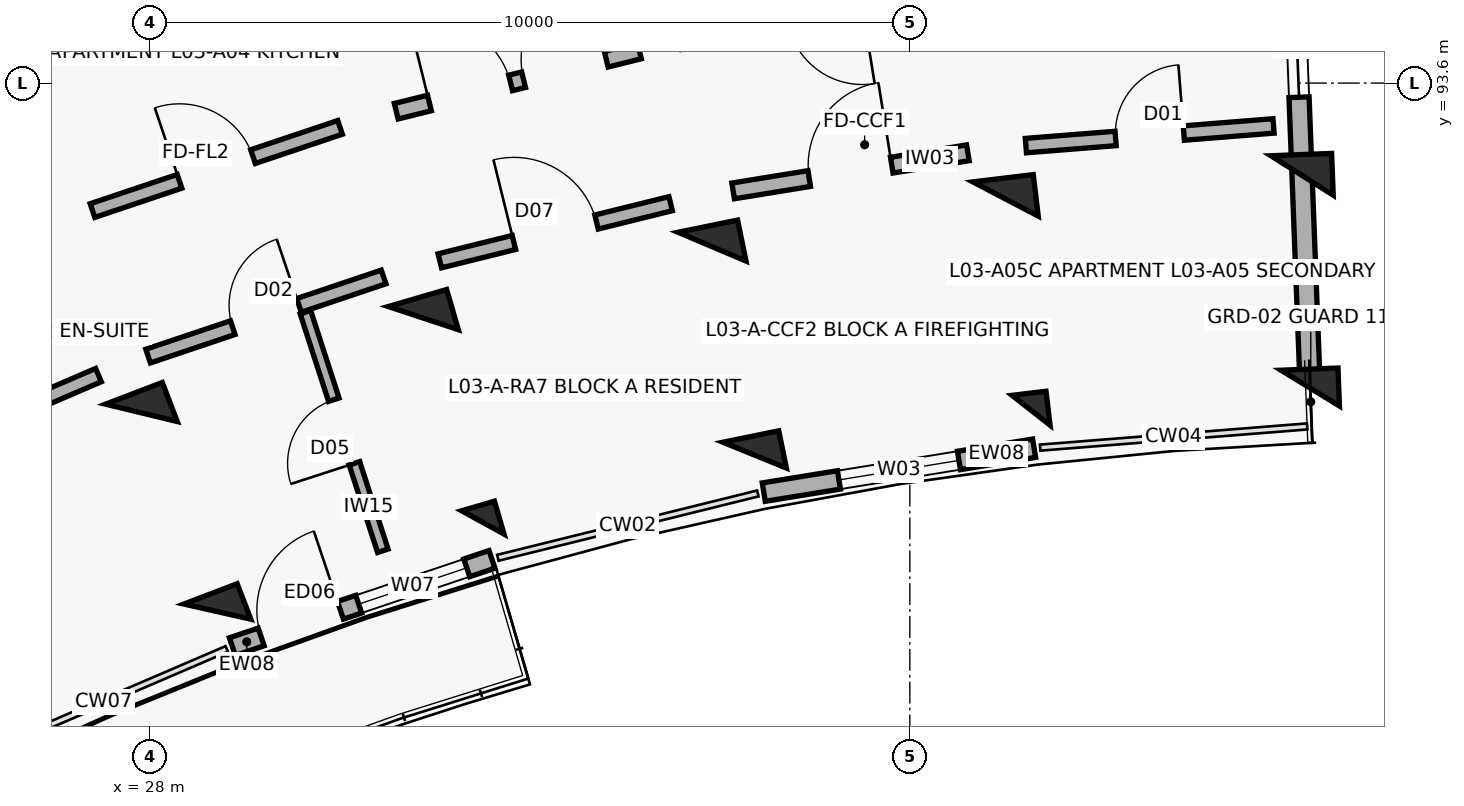
"""IFC4 building model, lengths in metres.
Left out: names, types, materials, properties, quantities, classifications, styles, units other than length and angle.
Written with IfcOpenShell. Run it as: python <this file> out.ifc"""

import sys

from ifc_helpers import new_model, si_unit, direction, frame, frame_2d, origin, origin_2d, place, context, subcontext, project, spatial, rectangle, extrude, element, fill, save


model = new_model("IFC4")
c1 = context("Model", 3, precision=1e-05, world=origin(), true_north=direction((0.0, 1.0)))
c2 = subcontext(c1, "Body", "Model", "MODEL_VIEW")
j1 = project(units=[si_unit("LENGTHUNIT", "METRE"), si_unit("PLANEANGLEUNIT", "RADIAN")], contexts=[c1])
p1 = place(None, origin())
s1 = spatial("IfcSite", under=j1, at=p1, CompositionType="ELEMENT")
p2 = place(p1, origin())
s2 = spatial("IfcBuilding", under=s1, at=p2, CompositionType="ELEMENT")
p3 = place(p2, frame((0.0, 0.0, 11.2)))
s3 = spatial("IfcBuildingStorey", under=s2, at=p3, CompositionType="ELEMENT", Elevation=11.2)
p4 = place(p3, frame((28.889, 86.646, 0.0), z_axis=(0.0, 0.0, 1.0), x_axis=(-0.357064076459, 0.934079892355, 0.0)))
e1 = element("IfcColumn", 1, at=p4, inside=s3, PredefinedType="COLUMN", context=c2, shape_type="SweptSolid", body=[
    extrude(rectangle(XDim=0.5, YDim=0.75, at=origin_2d()), origin(), (0.0, 0.0, 1.0), 3.1),
])
p5 = place(p3, frame((27.889, 89.261, 0.0), z_axis=(0.0, 0.0, 1.0), x_axis=(-0.357064076459, 0.934079892355, 0.0)))
e2 = element("IfcColumn", 2, at=p5, inside=s3, PredefinedType="COLUMN", context=c2, shape_type="SweptSolid", body=[
    extrude(rectangle(XDim=0.55, YDim=0.8, at=origin_2d()), origin(), (0.0, 0.0, 1.0), 3.1),
])
p6 = place(p3, frame((32.382, 87.82, 0.0), z_axis=(0.0, 0.0, 1.0), x_axis=(-0.27966144946, 0.96009867914, 0.0)))
e3 = element("IfcColumn", 3, at=p6, inside=s3, PredefinedType="COLUMN", context=c2, shape_type="SweptSolid", body=[
    extrude(rectangle(XDim=0.45, YDim=0.45, at=origin_2d()), origin(), (0.0, 0.0, 1.0), 3.1),
])
p7 = place(p3, frame((31.599, 90.508, 0.0), z_axis=(0.0, 0.0, 1.0), x_axis=(-0.27966144946, 0.96009867914, 0.0)))
e4 = element("IfcColumn", 4, at=p7, inside=s3, PredefinedType="COLUMN", context=c2, shape_type="SweptSolid", body=[
    extrude(rectangle(XDim=0.55, YDim=0.8, at=origin_2d()), origin(), (0.0, 0.0, 1.0), 3.1),
])
p8 = place(p3, frame((35.958, 88.705, 0.0), z_axis=(0.0, 0.0, 1.0), x_axis=(-0.200393999665, 0.979715389742, 0.0)))
e5 = element("IfcColumn", 5, at=p8, inside=s3, PredefinedType="COLUMN", context=c2, shape_type="SweptSolid", body=[
    extrude(rectangle(XDim=0.5, YDim=0.75, at=origin_2d()), origin(), (0.0, 0.0, 1.0), 3.1),
])
p9 = place(p3, frame((35.397, 91.448, 0.0), z_axis=(0.0, 0.0, 1.0), x_axis=(-0.200393999665, 0.979715389742, 0.0)))
e6 = element("IfcColumn", 6, at=p9, inside=s3, PredefinedType="COLUMN", context=c2, shape_type="SweptSolid", body=[
    extrude(rectangle(XDim=0.55, YDim=0.8, at=origin_2d()), origin(), (0.0, 0.0, 1.0), 3.1),
])
p10 = place(p3, frame((39.595, 89.295, 0.0), z_axis=(0.0, 0.0, 1.0), x_axis=(-0.119790293837, 0.992799217114, 0.0)))
e7 = element("IfcColumn", 7, at=p10, inside=s3, PredefinedType="COLUMN", context=c2, shape_type="SweptSolid", body=[
    extrude(rectangle(XDim=0.45, YDim=0.45, at=origin_2d()), origin(), (0.0, 0.0, 1.0), 3.1),
])
p11 = place(p3, frame((39.26, 92.075, 0.0), z_axis=(0.0, 0.0, 1.0), x_axis=(-0.119790293837, 0.992799217114, 0.0)))
e8 = element("IfcColumn", 8, at=p11, inside=s3, PredefinedType="COLUMN", context=c2, shape_type="SweptSolid", body=[
    extrude(rectangle(XDim=0.55, YDim=0.8, at=origin_2d()), origin(), (0.0, 0.0, 1.0), 3.1),
])
p12 = place(p3, frame((43.268, 89.587, 0.0), z_axis=(0.0, 0.0, 1.0), x_axis=(-0.038387809088, 0.999262916411, 0.0)))
e9 = element("IfcColumn", 9, at=p12, inside=s3, PredefinedType="COLUMN", context=c2, shape_type="SweptSolid", body=[
    extrude(rectangle(XDim=0.5, YDim=0.75, at=origin_2d()), origin(), (0.0, 0.0, 1.0), 3.1),
])
p13 = place(p3, frame((43.16, 92.385, 0.0), z_axis=(0.0, 0.0, 1.0), x_axis=(-0.038387809088, 0.999262916411, 0.0)))
e10 = element("IfcColumn", 10, at=p13, inside=s3, PredefinedType="COLUMN", context=c2, shape_type="SweptSolid", body=[
    extrude(rectangle(XDim=0.55, YDim=0.8, at=origin_2d()), origin(), (0.0, 0.0, 1.0), 3.1),
])
p14 = place(p3, frame((29.087, 86.185, 0.0), z_axis=(0.0, 0.0, 1.0), x_axis=(0.947880824442, 0.318625081649, 0.0)))
e11 = element("IfcWall", 11, at=p14, inside=s3, PredefinedType="SOLIDWALL", context=c2, shape_type="SweptSolid", body=[
    extrude(rectangle(XDim=3.604, YDim=0.245, at=frame_2d((1.802, 0.0))), origin(), (0.0, 0.0, 1.0), 2.25),
])
p15 = place(p14, frame((0.4, 0.0, 0.0)))
e12 = element("IfcOpeningElement", 12, at=p15, cuts=e11, PredefinedType="OPENING", context=c2, shape_type="SweptSolid", body=[
    extrude(rectangle(XDim=1.1, YDim=2.15, at=frame_2d((0.55, 1.075))), frame((0.0, 0.133, 0.0), z_axis=(0.0, -1.0, 0.0), x_axis=(1.0, 0.0, 0.0)), (0.0, 0.0, 1.0), 0.265),
])
p16 = place(p14, frame((1.754, 0.0, 0.35)))
e13 = element("IfcOpeningElement", 13, at=p16, cuts=e11, PredefinedType="OPENING", context=c2, shape_type="SweptSolid", body=[
    extrude(rectangle(XDim=1.5, YDim=1.65, at=frame_2d((0.75, 0.825))), frame((0.0, 0.133, 0.0), z_axis=(0.0, -1.0, 0.0), x_axis=(1.0, 0.0, 0.0)), (0.0, 0.0, 1.0), 0.265),
])
p17 = place(p3, frame((36.078, 88.218, 0.0), z_axis=(0.0, 0.0, 1.0), x_axis=(0.987080874485, 0.160222804952, 0.0)))
e14 = element("IfcWall", 14, at=p17, inside=s3, PredefinedType="SOLIDWALL", context=c2, shape_type="SweptSolid", body=[
    extrude(rectangle(XDim=3.604, YDim=0.245, at=frame_2d((1.802, 0.0))), origin(), (0.0, 0.0, 1.0), 2.25),
])
p18 = place(p17, frame((1.002, 0.0, 0.32)))
e15 = element("IfcOpeningElement", 15, at=p18, cuts=e14, PredefinedType="OPENING", context=c2, shape_type="SweptSolid", body=[
    extrude(rectangle(XDim=1.6, YDim=1.5, at=frame_2d((0.8, 0.75))), frame((0.0, 0.133, 0.0), z_axis=(0.0, -1.0, 0.0), x_axis=(1.0, 0.0, 0.0)), (0.0, 0.0, 1.0), 0.265),
])
p19 = place(p3, frame((43.259, 89.827, 0.0), z_axis=(0.0, 0.0, 1.0), x_axis=(-0.038407966241, 0.999262141847, 0.0)))
e16 = element("IfcWall", 16, at=p19, inside=s3, PredefinedType="SOLIDWALL", context=c2, shape_type="SweptSolid", body=[
    extrude(rectangle(XDim=8.2, YDim=0.265, at=frame_2d((4.1, 0.0))), origin(), (0.0, 0.0, 1.0), 2.08),
])
p20 = place(p19, frame((3.59, 0.0, 0.75)))
e17 = element("IfcOpeningElement", 17, at=p20, cuts=e16, PredefinedType="OPENING", context=c2, shape_type="SweptSolid", body=[
    extrude(rectangle(XDim=1.35, YDim=1.35, at=frame_2d((0.675, 0.675))), frame((0.0, 0.142, 0.0), z_axis=(0.0, -1.0, 0.0), x_axis=(1.0, 0.0, 0.0)), (0.0, 0.0, 1.0), 0.285),
])
p21 = place(p3, frame((24.322, 88.467, 0.0), z_axis=(0.0, 0.0, 1.0), x_axis=(0.918723391052, 0.394901672235, 0.0)))
e18 = element("IfcWall", 18, at=p21, inside=s3, PredefinedType="SOLIDWALL", context=c2, shape_type="SweptSolid", body=[
    extrude(rectangle(XDim=3.269, YDim=0.19, at=frame_2d((1.634, 0.0))), origin(), (0.0, 0.0, 1.0), 2.08),
])
p22 = place(p21, frame((1.184, 0.0, 0.0)))
e19 = element("IfcOpeningElement", 19, at=p22, cuts=e18, PredefinedType="OPENING", context=c2, shape_type="SweptSolid", body=[
    extrude(rectangle(XDim=0.9, YDim=2.1, at=frame_2d((0.45, 1.05))), frame((0.0, 0.105, 0.0), z_axis=(0.0, -1.0, 0.0), x_axis=(1.0, 0.0, 0.0)), (0.0, 0.0, 1.0), 0.21),
])
p23 = place(p3, frame((27.247, 91.923, 0.0), z_axis=(0.0, 0.0, 1.0), x_axis=(0.947863007629, 0.318678080151, 0.0)))
e20 = element("IfcWall", 20, at=p23, inside=s3, PredefinedType="SOLIDWALL", context=c2, shape_type="SweptSolid", body=[
    extrude(rectangle(XDim=3.436, YDim=0.19, at=frame_2d((1.718, 0.0))), origin(), (0.0, 0.0, 1.0), 2.08),
])
p24 = place(p23, frame((1.208, 0.0, 0.0)))
e21 = element("IfcOpeningElement", 21, at=p24, cuts=e20, PredefinedType="OPENING", context=c2, shape_type="SweptSolid", body=[
    extrude(rectangle(XDim=1.02, YDim=2.15, at=frame_2d((0.51, 1.075))), frame((0.0, 0.105, 0.0), z_axis=(0.0, -1.0, 0.0), x_axis=(1.0, 0.0, 0.0)), (0.0, 0.0, 1.0), 0.21),
])
p25 = place(p3, frame((27.979, 90.008, 0.0), z_axis=(0.0, 0.0, 1.0), x_axis=(0.94787351033, 0.318646839643, 0.0)))
e22 = element("IfcWall", 22, at=p25, inside=s3, PredefinedType="SOLIDWALL", context=c2, shape_type="SweptSolid", body=[
    extrude(rectangle(XDim=3.269, YDim=0.19, at=frame_2d((1.634, 0.0))), origin(), (0.0, 0.0, 1.0), 2.08),
])
p26 = place(p25, frame((1.174, 0.0, 0.0)))
e23 = element("IfcOpeningElement", 23, at=p26, cuts=e22, PredefinedType="OPENING", context=c2, shape_type="SweptSolid", body=[
    extrude(rectangle(XDim=0.92, YDim=2.1, at=frame_2d((0.46, 1.05))), frame((0.0, 0.105, 0.0), z_axis=(0.0, -1.0, 0.0), x_axis=(1.0, 0.0, 0.0)), (0.0, 0.0, 1.0), 0.21),
])
p27 = place(p3, frame((31.066, 87.446, 0.0), z_axis=(0.0, 0.0, 1.0), x_axis=(-0.308582493915, 0.951197584337, 0.0)))
e24 = element("IfcWall", 24, at=p27, inside=s3, PredefinedType="PARTITIONING", context=c2, shape_type="SweptSolid", body=[
    extrude(rectangle(XDim=3.3, YDim=0.145, at=frame_2d((1.65, 0.0))), origin(), (0.0, 0.0, 1.0), 2.08),
])
p28 = place(p27, frame((1.21, 0.0, 0.0)))
e25 = element("IfcOpeningElement", 25, at=p28, cuts=e24, PredefinedType="OPENING", context=c2, shape_type="SweptSolid", body=[
    extrude(rectangle(XDim=0.88, YDim=2.1, at=frame_2d((0.44, 1.05))), frame((0.0, 0.083, 0.0), z_axis=(0.0, -1.0, 0.0), x_axis=(1.0, 0.0, 0.0)), (0.0, 0.0, 1.0), 0.165),
])
p29 = place(p3, frame((31.243, 93.23, 0.0), z_axis=(0.0, 0.0, 1.0), x_axis=(0.970719238682, 0.240216901263, 0.0)))
e26 = element("IfcWall", 26, at=p29, inside=s3, PredefinedType="SOLIDWALL", context=c2, shape_type="SweptSolid", body=[
    extrude(rectangle(XDim=3.296, YDim=0.21, at=frame_2d((1.648, 0.0))), origin(), (0.0, 0.0, 1.0), 2.08),
])
p30 = place(p29, frame((0.45, 0.0, 0.0)))
e27 = element("IfcOpeningElement", 27, at=p30, cuts=e26, PredefinedType="OPENING", context=c2, shape_type="SweptSolid", body=[
    extrude(rectangle(XDim=1.1, YDim=2.15, at=frame_2d((0.55, 1.075))), frame((0.0, 0.115, 0.0), z_axis=(0.0, -1.0, 0.0), x_axis=(1.0, 0.0, 0.0)), (0.0, 0.0, 1.0), 0.23),
])
p31 = place(p29, frame((1.726, 0.0, 0.0)))
e28 = element("IfcOpeningElement", 28, at=p31, cuts=e26, PredefinedType="OPENING", context=c2, shape_type="SweptSolid", body=[
    extrude(rectangle(XDim=1.12, YDim=2.15, at=frame_2d((0.56, 1.075))), frame((0.0, 0.115, 0.0), z_axis=(0.0, -1.0, 0.0), x_axis=(1.0, 0.0, 0.0)), (0.0, 0.0, 1.0), 0.23),
])
p32 = place(p3, frame((31.816, 91.262, 0.0), z_axis=(0.0, 0.0, 1.0), x_axis=(0.970727194092, 0.240184751078, 0.0)))
e29 = element("IfcWall", 29, at=p32, inside=s3, PredefinedType="SOLIDWALL", context=c2, shape_type="SweptSolid", body=[
    extrude(rectangle(XDim=3.129, YDim=0.19, at=frame_2d((1.564, 0.0))), origin(), (0.0, 0.0, 1.0), 2.08),
])
p33 = place(p32, frame((1.004, 0.0, 0.0)))
e30 = element("IfcOpeningElement", 30, at=p33, cuts=e29, PredefinedType="OPENING", context=c2, shape_type="SweptSolid", body=[
    extrude(rectangle(XDim=1.12, YDim=2.15, at=frame_2d((0.56, 1.075))), frame((0.0, 0.105, 0.0), z_axis=(0.0, -1.0, 0.0), x_axis=(1.0, 0.0, 0.0)), (0.0, 0.0, 1.0), 0.21),
])
p34 = place(p3, frame((35.676, 92.181, 0.0), z_axis=(0.0, 0.0, 1.0), x_axis=(0.98707079686, 0.160284877599, 0.0)))
e31 = element("IfcWall", 31, at=p34, inside=s3, PredefinedType="SOLIDWALL", context=c2, shape_type="SweptSolid", body=[
    extrude(rectangle(XDim=3.129, YDim=0.21, at=frame_2d((1.564, 0.0))), origin(), (0.0, 0.0, 1.0), 2.08),
])
p35 = place(p34, frame((1.014, 0.0, 0.0)))
e32 = element("IfcOpeningElement", 32, at=p35, cuts=e31, PredefinedType="OPENING", context=c2, shape_type="SweptSolid", body=[
    extrude(rectangle(XDim=1.1, YDim=2.15, at=frame_2d((0.55, 1.075))), frame((0.0, 0.115, 0.0), z_axis=(0.0, -1.0, 0.0), x_axis=(1.0, 0.0, 0.0)), (0.0, 0.0, 1.0), 0.23),
])
p36 = place(p3, frame((39.527, 92.778, 0.0), z_axis=(0.0, 0.0, 1.0), x_axis=(0.99686660806, 0.07910098441, 0.0)))
e33 = element("IfcWall", 33, at=p36, inside=s3, PredefinedType="SOLIDWALL", context=c2, shape_type="SweptSolid", body=[
    extrude(rectangle(XDim=3.269, YDim=0.19, at=frame_2d((1.634, 0.0))), origin(), (0.0, 0.0, 1.0), 2.08),
])
p37 = place(p36, frame((1.184, 0.0, 0.0)))
e34 = element("IfcOpeningElement", 34, at=p37, cuts=e33, PredefinedType="OPENING", context=c2, shape_type="SweptSolid", body=[
    extrude(rectangle(XDim=0.9, YDim=2.1, at=frame_2d((0.45, 1.05))), frame((0.0, 0.105, 0.0), z_axis=(0.0, -1.0, 0.0), x_axis=(1.0, 0.0, 0.0)), (0.0, 0.0, 1.0), 0.21),
])
p38 = place(p15, origin())
e35 = element("IfcDoor", 35, at=p38, inside=s3, OperationType="SINGLE_SWING_RIGHT", PredefinedType="DOOR", context=c2, shape_type="SweptSolid", body=[
    extrude(rectangle(XDim=1.1, YDim=2.15, at=frame_2d((0.55, 1.075))), frame((0.0, 0.025, 0.0), z_axis=(0.0, -1.0, 0.0), x_axis=(1.0, 0.0, 0.0)), (0.0, 0.0, 1.0), 0.05),
])
fill(e12, e35)
p39 = place(p16, origin())
e36 = element("IfcWindow", 36, at=p39, inside=s3, PartitioningType="DOUBLE_PANEL_VERTICAL", PredefinedType="WINDOW", context=c2, shape_type="SweptSolid", body=[
    extrude(rectangle(XDim=1.5, YDim=1.65, at=frame_2d((0.75, 0.825))), frame((0.0, 0.03, 0.0), z_axis=(0.0, -1.0, 0.0), x_axis=(1.0, 0.0, 0.0)), (0.0, 0.0, 1.0), 0.06),
])
fill(e13, e36)
p40 = place(p18, origin())
e37 = element("IfcWindow", 37, at=p40, inside=s3, PartitioningType="DOUBLE_PANEL_VERTICAL", PredefinedType="WINDOW", context=c2, shape_type="SweptSolid", body=[
    extrude(rectangle(XDim=1.6, YDim=1.5, at=frame_2d((0.8, 0.75))), frame((0.0, 0.03, 0.0), z_axis=(0.0, -1.0, 0.0), x_axis=(1.0, 0.0, 0.0)), (0.0, 0.0, 1.0), 0.06),
])
fill(e15, e37)
p41 = place(p20, origin())
e38 = element("IfcWindow", 38, at=p41, inside=s3, PartitioningType="DOUBLE_PANEL_VERTICAL", PredefinedType="WINDOW", context=c2, shape_type="SweptSolid", body=[
    extrude(rectangle(XDim=1.35, YDim=1.35, at=frame_2d((0.675, 0.675))), frame((0.0, 0.03, 0.0), z_axis=(0.0, -1.0, 0.0), x_axis=(1.0, 0.0, 0.0)), (0.0, 0.0, 1.0), 0.06),
])
fill(e17, e38)
p42 = place(p24, origin())
e39 = element("IfcDoor", 39, at=p42, inside=s3, OperationType="SINGLE_SWING_LEFT", PredefinedType="DOOR", context=c2, shape_type="SweptSolid", body=[
    extrude(rectangle(XDim=1.02, YDim=2.15, at=frame_2d((0.51, 1.075))), frame((0.0, 0.025, 0.0), z_axis=(0.0, -1.0, 0.0), x_axis=(1.0, 0.0, 0.0)), (0.0, 0.0, 1.0), 0.05),
])
fill(e21, e39)
p43 = place(p26, origin())
e40 = element("IfcDoor", 40, at=p43, inside=s3, OperationType="SINGLE_SWING_RIGHT", PredefinedType="DOOR", context=c2, shape_type="SweptSolid", body=[
    extrude(rectangle(XDim=0.92, YDim=2.1, at=frame_2d((0.46, 1.05))), frame((0.0, 0.025, 0.0), z_axis=(0.0, -1.0, 0.0), x_axis=(1.0, 0.0, 0.0)), (0.0, 0.0, 1.0), 0.05),
])
fill(e23, e40)
p44 = place(p28, origin())
e41 = element("IfcDoor", 41, at=p44, inside=s3, OperationType="SINGLE_SWING_LEFT", PredefinedType="DOOR", context=c2, shape_type="SweptSolid", body=[
    extrude(rectangle(XDim=0.88, YDim=2.1, at=frame_2d((0.44, 1.05))), frame((0.0, 0.025, 0.0), z_axis=(0.0, -1.0, 0.0), x_axis=(1.0, 0.0, 0.0)), (0.0, 0.0, 1.0), 0.05),
])
fill(e25, e41)
p45 = place(p30, origin())
e42 = element("IfcDoor", 42, at=p45, inside=s3, OperationType="SINGLE_SWING_LEFT", PredefinedType="DOOR", context=c2, shape_type="SweptSolid", body=[
    extrude(rectangle(XDim=1.1, YDim=2.15, at=frame_2d((0.55, 1.075))), frame((0.0, 0.025, 0.0), z_axis=(0.0, -1.0, 0.0), x_axis=(1.0, 0.0, 0.0)), (0.0, 0.0, 1.0), 0.05),
])
fill(e27, e42)
p46 = place(p31, origin())
e43 = element("IfcDoor", 43, at=p46, inside=s3, OperationType="SINGLE_SWING_RIGHT", PredefinedType="DOOR", context=c2, shape_type="SweptSolid", body=[
    extrude(rectangle(XDim=1.12, YDim=2.15, at=frame_2d((0.56, 1.075))), frame((0.0, 0.025, 0.0), z_axis=(0.0, -1.0, 0.0), x_axis=(1.0, 0.0, 0.0)), (0.0, 0.0, 1.0), 0.05),
])
fill(e28, e43)
p47 = place(p33, origin())
e44 = element("IfcDoor", 44, at=p47, inside=s3, OperationType="SINGLE_SWING_LEFT", PredefinedType="DOOR", context=c2, shape_type="SweptSolid", body=[
    extrude(rectangle(XDim=1.12, YDim=2.15, at=frame_2d((0.56, 1.075))), frame((0.0, 0.025, 0.0), z_axis=(0.0, -1.0, 0.0), x_axis=(1.0, 0.0, 0.0)), (0.0, 0.0, 1.0), 0.05),
])
fill(e30, e44)
p48 = place(p35, origin())
e45 = element("IfcDoor", 45, at=p48, inside=s3, OperationType="SINGLE_SWING_RIGHT", PredefinedType="DOOR", context=c2, shape_type="SweptSolid", body=[
    extrude(rectangle(XDim=1.1, YDim=2.15, at=frame_2d((0.55, 1.075))), frame((0.0, 0.025, 0.0), z_axis=(0.0, -1.0, 0.0), x_axis=(1.0, 0.0, 0.0)), (0.0, 0.0, 1.0), 0.05),
])
fill(e32, e45)
p49 = place(p37, origin())
e46 = element("IfcDoor", 46, at=p49, inside=s3, OperationType="SINGLE_SWING_RIGHT", PredefinedType="DOOR", context=c2, shape_type="SweptSolid", body=[
    extrude(rectangle(XDim=0.9, YDim=2.1, at=frame_2d((0.45, 1.05))), frame((0.0, 0.025, 0.0), z_axis=(0.0, -1.0, 0.0), x_axis=(1.0, 0.0, 0.0)), (0.0, 0.0, 1.0), 0.05),
])
fill(e34, e46)
save(model, sys.argv[1])
